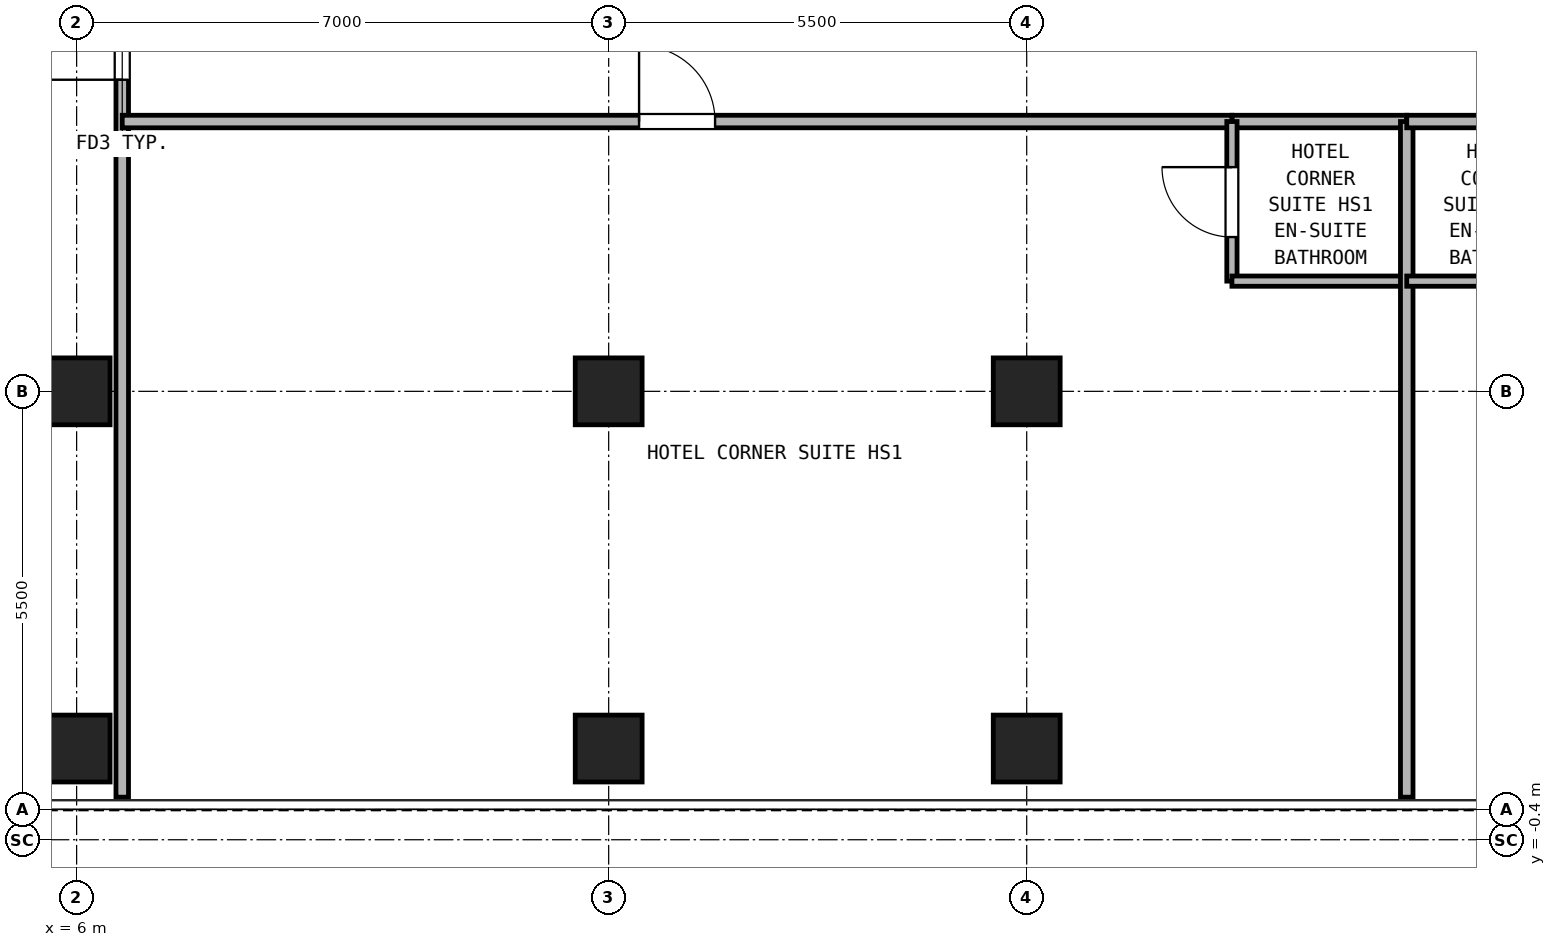
"""IFC4 building model, lengths in metres.
Left out: names, types, materials, properties, quantities, classifications, styles, units other than length and angle.
Written with IfcOpenShell. Run it as: python <this file> out.ifc"""

import sys

from ifc_helpers import new_model, si_unit, direction, frame, frame_2d, origin, origin_2d, place, context, subcontext, project, spatial, rectangle, hollow_rectangle, extrude, source, transform, mapped, element, fill, save


model = new_model("IFC4")
c1 = context("Model", 3, precision=1e-05, world=origin(), true_north=direction((0.0, 1.0)))
c2 = subcontext(c1, "Body", "Model", "MODEL_VIEW")
j1 = project(units=[si_unit("LENGTHUNIT", "METRE"), si_unit("PLANEANGLEUNIT", "RADIAN")], contexts=[c1])
p1 = place(None, origin())
s1 = spatial("IfcSite", under=j1, at=p1, CompositionType="ELEMENT")
p2 = place(p1, origin())
s2 = spatial("IfcBuilding", under=s1, at=p2, CompositionType="ELEMENT")
p3 = place(p2, frame((0.0, 0.0, 131.1)))
s3 = spatial("IfcBuildingStorey", under=s2, at=p3, CompositionType="ELEMENT", Elevation=131.1)
m1 = source(origin(), c2, "Body", "SweptSolid", [
    extrude(hollow_rectangle(XDim=0.88, YDim=0.88, WallThickness=0.05, at=origin_2d()), origin(), (0.0, 0.0, 1.0), 2.95),
])
for number, where, z_axis, x_axis in (
    (1, (6.0, 0.8, 0.0), (0.0, 0.0, 1.0), (1.0, 0.0, 0.0)),
    (2, (13.0, 0.8, 0.0), (0.0, 0.0, 1.0), (1.0, 0.0, 0.0)),
    (3, (18.5, 0.8, 0.0), (0.0, 0.0, 1.0), (1.0, 0.0, 0.0)),
    (4, (6.0, 5.5, 0.0), (0.0, 0.0, 1.0), (1.0, 0.0, 0.0)),
    (5, (13.0, 5.5, 0.0), (0.0, 0.0, 1.0), (1.0, 0.0, 0.0)),
    (6, (18.5, 5.5, 0.0), (0.0, 0.0, 1.0), (1.0, 0.0, 0.0)),
):
    element("IfcColumn", number, at=place(p3, frame(where, z_axis=z_axis, x_axis=x_axis)), inside=s3, PredefinedType="COLUMN", context=c2, shape_type="MappedRepresentation", body=[
        mapped(m1, transform((0.0, 0.0, 0.0), x_axis=(1.0, 0.0, 0.0), y_axis=(0.0, 1.0, 0.0), z_axis=(0.0, 0.0, 1.0), scale=1.0)),
    ])
p4 = place(p3, frame((6.6, 0.16, 0.0), z_axis=(0.0, 0.0, 1.0), x_axis=(0.0, 1.0, 0.0)))
e7 = element("IfcWall", 7, at=p4, inside=s3, PredefinedType="PARTITIONING", context=c2, shape_type="SweptSolid", body=[
    extrude(rectangle(XDim=10.99, YDim=0.165, at=frame_2d((5.495, 0.0))), origin(), (0.0, 0.0, 1.0), 2.95),
])
p5 = place(p4, frame((9.44, 0.0, 0.0)))
e8 = element("IfcOpeningElement", 8, at=p5, cuts=e7, PredefinedType="OPENING", context=c2, shape_type="SweptSolid", body=[
    extrude(rectangle(XDim=1.0, YDim=2.15, at=frame_2d((0.5, 1.075))), frame((0.0, 0.093, 0.0), z_axis=(0.0, -1.0, 0.0), x_axis=(1.0, 0.0, 0.0)), (0.0, 0.0, 1.0), 0.185),
])
p6 = place(p3, frame((21.2, 9.05, 0.0), z_axis=(0.0, 0.0, 1.0), x_axis=(1.0, 0.0, 0.0)))
e9 = element("IfcWall", 9, at=p6, inside=s3, PredefinedType="PARTITIONING", context=c2, shape_type="SweptSolid", body=[
    extrude(rectangle(XDim=2.3, YDim=0.165, at=frame_2d((1.15, 0.0))), origin(), (0.0, 0.0, 1.0), 2.95),
])
p7 = place(p3, frame((6.6, 9.05, 0.0), z_axis=(0.0, 0.0, 1.0), x_axis=(1.0, 0.0, 0.0)))
e10 = element("IfcWall", 10, at=p7, inside=s3, PredefinedType="PARTITIONING", context=c2, shape_type="SweptSolid", body=[
    extrude(rectangle(XDim=14.6, YDim=0.165, at=frame_2d((7.3, 0.0))), origin(), (0.0, 0.0, 1.0), 2.95),
])
p8 = place(p7, frame((6.8, 0.0, 0.0)))
e11 = element("IfcOpeningElement", 11, at=p8, cuts=e10, PredefinedType="OPENING", context=c2, shape_type="SweptSolid", body=[
    extrude(rectangle(XDim=1.0, YDim=2.15, at=frame_2d((0.5, 1.075))), frame((0.0, 0.093, 0.0), z_axis=(0.0, -1.0, 0.0), x_axis=(1.0, 0.0, 0.0)), (0.0, 0.0, 1.0), 0.185),
])
p9 = place(p3, frame((21.2, 6.95, 0.0), z_axis=(0.0, 0.0, 1.0), x_axis=(0.0, 1.0, 0.0)))
e12 = element("IfcWall", 12, at=p9, inside=s3, PredefinedType="PARTITIONING", context=c2, shape_type="SweptSolid", body=[
    extrude(rectangle(XDim=2.1, YDim=0.135, at=frame_2d((1.05, 0.0))), origin(), (0.0, 0.0, 1.0), 2.95),
])
p10 = place(p9, frame((0.58, 0.0, 0.0)))
e13 = element("IfcOpeningElement", 13, at=p10, cuts=e12, PredefinedType="OPENING", context=c2, shape_type="SweptSolid", body=[
    extrude(rectangle(XDim=0.92, YDim=2.1, at=frame_2d((0.46, 1.05))), frame((0.0, 0.077, 0.0), z_axis=(0.0, -1.0, 0.0), x_axis=(1.0, 0.0, 0.0)), (0.0, 0.0, 1.0), 0.155),
])
p11 = place(p3, frame((21.2, 6.95, 0.0), z_axis=(0.0, 0.0, 1.0), x_axis=(1.0, 0.0, 0.0)))
e14 = element("IfcWall", 14, at=p11, inside=s3, PredefinedType="PARTITIONING", context=c2, shape_type="SweptSolid", body=[
    extrude(rectangle(XDim=2.3, YDim=0.135, at=frame_2d((1.15, 0.0))), origin(), (0.0, 0.0, 1.0), 2.95),
])
p12 = place(p3, frame((23.5, 0.16, 0.0), z_axis=(0.0, 0.0, 1.0), x_axis=(0.0, 1.0, 0.0)))
e15 = element("IfcWall", 15, at=p12, inside=s3, PredefinedType="PARTITIONING", context=c2, shape_type="SweptSolid", body=[
    extrude(rectangle(XDim=8.89, YDim=0.165, at=frame_2d((4.445, 0.0))), origin(), (0.0, 0.0, 1.0), 2.95),
])
p13 = place(p3, frame((23.5, 9.05, 0.0), z_axis=(0.0, 0.0, 1.0), x_axis=(1.0, 0.0, 0.0)))
e16 = element("IfcWall", 16, at=p13, inside=s3, PredefinedType="PARTITIONING", context=c2, shape_type="SweptSolid", body=[
    extrude(rectangle(XDim=2.3, YDim=0.165, at=frame_2d((1.15, 0.0))), origin(), (0.0, 0.0, 1.0), 2.95),
])
p14 = place(p3, frame((23.5, 6.95, 0.0), z_axis=(0.0, 0.0, 1.0), x_axis=(1.0, 0.0, 0.0)))
e17 = element("IfcWall", 17, at=p14, inside=s3, PredefinedType="PARTITIONING", context=c2, shape_type="SweptSolid", body=[
    extrude(rectangle(XDim=2.3, YDim=0.135, at=frame_2d((1.15, 0.0))), origin(), (0.0, 0.0, 1.0), 2.95),
])
p15 = place(p5, origin())
e18 = element("IfcDoor", 18, at=p15, inside=s3, OperationType="SINGLE_SWING_LEFT", PredefinedType="DOOR", context=c2, shape_type="SweptSolid", body=[
    extrude(rectangle(XDim=1.0, YDim=2.15, at=frame_2d((0.5, 1.075))), frame((0.0, 0.025, 0.0), z_axis=(0.0, -1.0, 0.0), x_axis=(1.0, 0.0, 0.0)), (0.0, 0.0, 1.0), 0.05),
])
fill(e8, e18)
p16 = place(p10, origin())
e19 = element("IfcDoor", 19, at=p16, inside=s3, OperationType="SINGLE_SWING_RIGHT", PredefinedType="DOOR", context=c2, shape_type="SweptSolid", body=[
    extrude(rectangle(XDim=0.92, YDim=2.1, at=frame_2d((0.46, 1.05))), frame((0.0, 0.025, 0.0), z_axis=(0.0, -1.0, 0.0), x_axis=(1.0, 0.0, 0.0)), (0.0, 0.0, 1.0), 0.05),
])
fill(e13, e19)
p17 = place(p8, frame((1.0, 0.0, 0.0), z_axis=(0.0, 0.0, 1.0), x_axis=(-1.0, 0.0, 0.0)))
e20 = element("IfcDoor", 20, at=p17, inside=s3, OperationType="SINGLE_SWING_LEFT", PredefinedType="DOOR", context=c2, shape_type="SweptSolid", body=[
    extrude(rectangle(XDim=1.0, YDim=2.15, at=frame_2d((0.5, 1.075))), frame((0.0, 0.025, 0.0), z_axis=(0.0, -1.0, 0.0), x_axis=(1.0, 0.0, 0.0)), (0.0, 0.0, 1.0), 0.05),
])
fill(e11, e20)
save(model, sys.argv[1])
